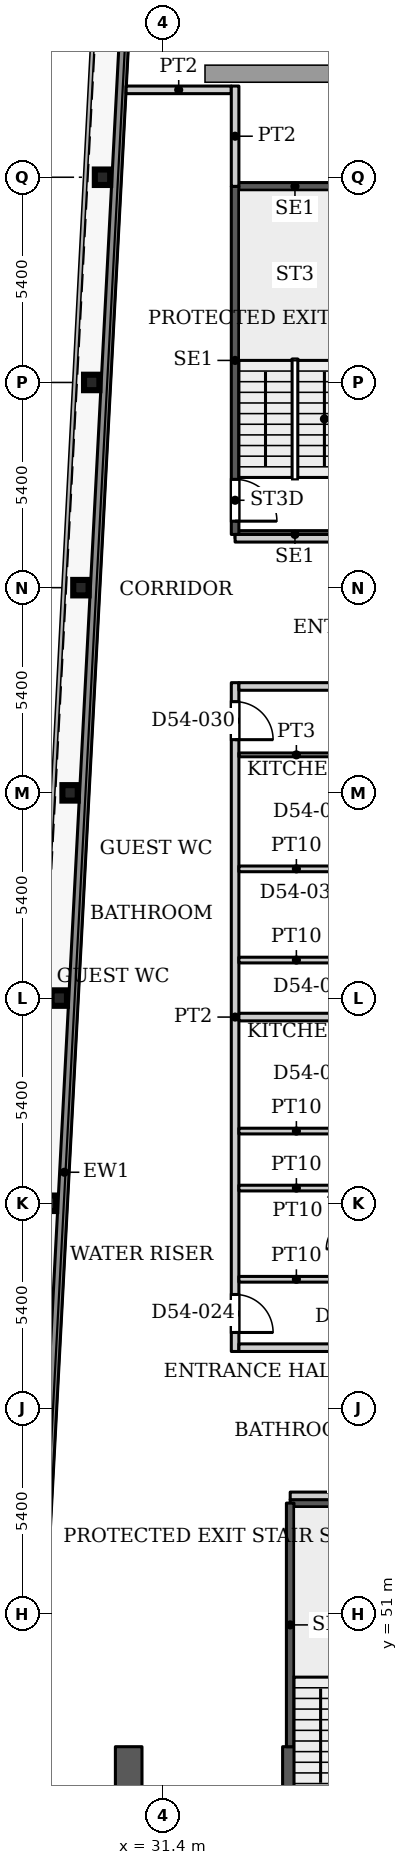
"""IFC4 building model, lengths in metres.
Left out: names, types, materials, properties, quantities, classifications, styles, units other than length and angle.
Written with IfcOpenShell. Run it as: python <this file> out.ifc"""

import sys

from ifc_helpers import new_model, si_unit, direction, frame, frame_2d, origin, origin_2d, place, context, subcontext, project, spatial, rectangle, i_section, extrude, source, transform, mapped, element, fill, save


model = new_model("IFC4")
c1 = context("Model", 3, precision=1e-05, world=origin(), true_north=direction((0.0, 1.0)))
c2 = subcontext(c1, "Body", "Model", "MODEL_VIEW")
j1 = project(units=[si_unit("LENGTHUNIT", "METRE"), si_unit("PLANEANGLEUNIT", "RADIAN")], contexts=[c1])
p1 = place(None, origin())
s1 = spatial("IfcSite", under=j1, at=p1, CompositionType="ELEMENT")
p2 = place(p1, origin())
s2 = spatial("IfcBuilding", under=s1, at=p2, CompositionType="ELEMENT")
p3 = place(p2, frame((0.0, 0.0, 231.8)))
s3 = spatial("IfcBuildingStorey", under=s2, at=p3, CompositionType="ELEMENT", Elevation=231.8)
for number, where, z_axis, x_axis in (
    (1, (28.39, 61.8, 0.0), (0.0, 0.0, 1.0), (1.0, 0.0, 0.0)),
    (2, (28.674, 67.2, 0.0), (0.0, 0.0, 1.0), (1.0, 0.0, 0.0)),
    (3, (28.958, 72.6, 0.0), (0.0, 0.0, 1.0), (1.0, 0.0, 0.0)),
    (4, (29.243, 78.0, 0.0), (0.0, 0.0, 1.0), (1.0, 0.0, 0.0)),
    (5, (29.527, 83.4, 0.0), (0.0, 0.0, 1.0), (1.0, 0.0, 0.0)),
    (6, (29.811, 88.8, 0.0), (0.0, 0.0, 1.0), (1.0, 0.0, 0.0)),
):
    element("IfcColumn", number, at=place(p3, frame(where, z_axis=z_axis, x_axis=x_axis)), inside=s3, PredefinedType="COLUMN", context=c2, shape_type="SweptSolid", body=[
        extrude(i_section(OverallWidth=0.404, OverallDepth=0.407, WebThickness=0.027, FlangeThickness=0.044, FilletRadius=0.012, at=origin_2d()), origin(), (0.0, 0.0, 1.0), 3.9),
    ])
p4 = place(p3, frame((34.75, 29.05, 0.0), z_axis=(0.0, 0.0, 1.0), x_axis=(0.0, 1.0, 0.0)))
e7 = element("IfcWall", 7, at=p4, inside=s3, PredefinedType="SHEAR", context=c2, shape_type="SweptSolid", body=[
    extrude(rectangle(XDim=18.45, YDim=0.4, at=frame_2d((9.225, 0.0))), origin(), (0.0, 0.0, 1.0), 3.9),
])
p5 = place(p4, frame((8.025, 0.0, 0.0)))
e8 = element("IfcOpeningElement", 8, at=p5, cuts=e7, PredefinedType="OPENING", context=c2, shape_type="SweptSolid", body=[
    extrude(rectangle(XDim=1.1, YDim=2.2, at=frame_2d((0.55, 1.1))), frame((0.0, 0.21, 0.0), z_axis=(0.0, -1.0, 0.0), x_axis=(1.0, 0.0, 0.0)), (0.0, 0.0, 1.0), 0.42),
])
p6 = place(p4, frame((10.875, 0.0, 0.0)))
e9 = element("IfcOpeningElement", 9, at=p6, cuts=e7, PredefinedType="OPENING", context=c2, shape_type="SweptSolid", body=[
    extrude(rectangle(XDim=1.1, YDim=2.2, at=frame_2d((0.55, 1.1))), frame((0.0, 0.21, 0.0), z_axis=(0.0, -1.0, 0.0), x_axis=(1.0, 0.0, 0.0)), (0.0, 0.0, 1.0), 0.42),
])
p7 = place(p4, frame((13.725, 0.0, 0.0)))
e10 = element("IfcOpeningElement", 10, at=p7, cuts=e7, PredefinedType="OPENING", context=c2, shape_type="SweptSolid", body=[
    extrude(rectangle(XDim=1.1, YDim=2.2, at=frame_2d((0.55, 1.1))), frame((0.0, 0.21, 0.0), z_axis=(0.0, -1.0, 0.0), x_axis=(1.0, 0.0, 0.0)), (0.0, 0.0, 1.0), 0.42),
])
p8 = place(p4, frame((15.95, 0.0, 0.0)))
e11 = element("IfcOpeningElement", 11, at=p8, cuts=e7, PredefinedType="OPENING", context=c2, shape_type="SweptSolid", body=[
    extrude(rectangle(XDim=1.1, YDim=2.2, at=frame_2d((0.55, 1.1))), frame((0.0, 0.21, 0.0), z_axis=(0.0, -1.0, 0.0), x_axis=(1.0, 0.0, 0.0)), (0.0, 0.0, 1.0), 0.42),
])
p9 = place(p3, frame((30.5, 29.05, 0.0), z_axis=(0.0, 0.0, 1.0), x_axis=(0.0, 1.0, 0.0)))
e12 = element("IfcWall", 12, at=p9, inside=s3, PredefinedType="SHEAR", context=c2, shape_type="SweptSolid", body=[
    extrude(rectangle(XDim=18.45, YDim=0.7, at=frame_2d((9.225, 0.0))), origin(), (0.0, 0.0, 1.0), 3.9),
])
p10 = place(p9, frame((1.5, 0.0, 0.0)))
e13 = element("IfcOpeningElement", 13, at=p10, cuts=e12, PredefinedType="OPENING", context=c2, shape_type="SweptSolid", body=[
    extrude(rectangle(XDim=0.9, YDim=2.2, at=frame_2d((0.45, 1.1))), frame((0.0, 0.36, 0.0), z_axis=(0.0, -1.0, 0.0), x_axis=(1.0, 0.0, 0.0)), (0.0, 0.0, 1.0), 0.72),
])
p11 = place(p9, frame((8.705, 0.0, 0.0)))
e14 = element("IfcOpeningElement", 14, at=p11, cuts=e12, PredefinedType="OPENING", context=c2, shape_type="SweptSolid", body=[
    extrude(rectangle(XDim=0.9, YDim=2.2, at=frame_2d((0.45, 1.1))), frame((0.0, 0.36, 0.0), z_axis=(0.0, -1.0, 0.0), x_axis=(1.0, 0.0, 0.0)), (0.0, 0.0, 1.0), 0.72),
])
p12 = place(p3, frame((27.195, 31.969, 0.0), z_axis=(0.0, 0.0, 1.0), x_axis=(0.052555284099, 0.998618016117, 0.0)))
e15 = element("IfcWall", 15, at=p12, inside=s3, PredefinedType="SOLIDWALL", context=c2, shape_type="SweptSolid", body=[
    extrude(rectangle(XDim=61.38, YDim=0.25, at=frame_2d((30.69, 0.0))), origin(), (0.0, 0.0, 1.0), 3.75),
])
p13 = place(p3, frame((34.75, 53.91, 0.0), z_axis=(0.0, 0.0, 1.0), x_axis=(1.0, 0.0, 0.0)))
e16 = element("IfcWall", 16, at=p13, inside=s3, PredefinedType="SHEAR", context=c2, shape_type="SweptSolid", body=[
    extrude(rectangle(XDim=3.15, YDim=0.2, at=frame_2d((1.575, 0.0))), origin(), (0.0, 0.0, 1.0), 3.9),
])
p14 = place(p3, frame((34.75, 47.5, 0.0), z_axis=(0.0, 0.0, 1.0), x_axis=(0.0, 1.0, 0.0)))
e17 = element("IfcWall", 17, at=p14, inside=s3, PredefinedType="SHEAR", context=c2, shape_type="SweptSolid", body=[
    extrude(rectangle(XDim=6.41, YDim=0.2, at=frame_2d((3.205, 0.0))), origin(), (0.0, 0.0, 1.0), 3.9),
])
for number, where, z_axis, x_axis in (
    (18, (33.3, 79.4, 0.0), (0.0, 0.0, 1.0), (1.0, 0.0, 0.0)),
    (19, (33.3, 88.56, 0.0), (0.0, 0.0, 1.0), (1.0, 0.0, 0.0)),
):
    element("IfcWall", number, at=place(p3, frame(where, z_axis=z_axis, x_axis=x_axis)), inside=s3, PredefinedType="SHEAR", context=c2, shape_type="SweptSolid", body=[
        extrude(rectangle(XDim=3.15, YDim=0.2, at=frame_2d((1.575, 0.0))), origin(), (0.0, 0.0, 1.0), 3.9),
    ])
p15 = place(p3, frame((33.3, 79.4, 0.0), z_axis=(0.0, 0.0, 1.0), x_axis=(0.0, 1.0, 0.0)))
e20 = element("IfcWall", 20, at=p15, inside=s3, PredefinedType="SHEAR", context=c2, shape_type="SweptSolid", body=[
    extrude(rectangle(XDim=9.16, YDim=0.2, at=frame_2d((4.58, 0.0))), origin(), (0.0, 0.0, 1.0), 3.9),
])
p16 = place(p15, frame((0.35, 0.0, 0.0)))
e21 = element("IfcOpeningElement", 21, at=p16, cuts=e20, PredefinedType="OPENING", context=c2, shape_type="SweptSolid", body=[
    extrude(rectangle(XDim=1.1, YDim=2.2, at=frame_2d((0.55, 1.1))), frame((0.0, 0.11, 0.0), z_axis=(0.0, -1.0, 0.0), x_axis=(1.0, 0.0, 0.0)), (0.0, 0.0, 1.0), 0.22),
])
p17 = place(p3, frame((30.432, 91.1, 0.0), z_axis=(0.0, 0.0, 1.0), x_axis=(1.0, 0.0, 0.0)))
e22 = element("IfcWall", 22, at=p17, inside=s3, PredefinedType="PARTITIONING", context=c2, shape_type="SweptSolid", body=[
    extrude(rectangle(XDim=2.768, YDim=0.2, at=frame_2d((1.384, 0.0))), origin(), (0.0, 0.0, 1.0), 3.6),
])
p18 = place(p3, frame((33.3, 57.9, 0.0), z_axis=(0.0, 0.0, 1.0), x_axis=(0.0, 1.0, 0.0)))
e23 = element("IfcWall", 23, at=p18, inside=s3, PredefinedType="PARTITIONING", context=c2, shape_type="SweptSolid", body=[
    extrude(rectangle(XDim=17.6, YDim=0.2, at=frame_2d((8.8, 0.0))), origin(), (0.0, 0.0, 1.0), 3.6),
])
p19 = place(p18, frame((0.5, 0.0, 0.0)))
e24 = element("IfcOpeningElement", 24, at=p19, cuts=e23, PredefinedType="OPENING", context=c2, shape_type="SweptSolid", body=[
    extrude(rectangle(XDim=1.0, YDim=2.1, at=frame_2d((0.5, 1.05))), frame((0.0, 0.11, 0.0), z_axis=(0.0, -1.0, 0.0), x_axis=(1.0, 0.0, 0.0)), (0.0, 0.0, 1.0), 0.22),
])
p20 = place(p18, frame((16.1, 0.0, 0.0)))
e25 = element("IfcOpeningElement", 25, at=p20, cuts=e23, PredefinedType="OPENING", context=c2, shape_type="SweptSolid", body=[
    extrude(rectangle(XDim=1.0, YDim=2.1, at=frame_2d((0.5, 1.05))), frame((0.0, 0.11, 0.0), z_axis=(0.0, -1.0, 0.0), x_axis=(1.0, 0.0, 0.0)), (0.0, 0.0, 1.0), 0.22),
])
p21 = place(p3, frame((33.3, 79.3, 0.0), z_axis=(0.0, 0.0, 1.0), x_axis=(1.0, 0.0, 0.0)))
e26 = element("IfcWall", 26, at=p21, inside=s3, PredefinedType="PARTITIONING", context=c2, shape_type="SweptSolid", body=[
    extrude(rectangle(XDim=12.6, YDim=0.2, at=frame_2d((6.3, 0.0))), origin(), (0.0, 0.0, 1.0), 3.6),
])
p22 = place(p21, frame((5.795, 0.0, 0.0)))
e27 = element("IfcOpeningElement", 27, at=p22, cuts=e26, PredefinedType="OPENING", context=c2, shape_type="SweptSolid", body=[
    extrude(rectangle(XDim=1.0, YDim=2.1, at=frame_2d((0.5, 1.05))), frame((0.0, 0.11, 0.0), z_axis=(0.0, -1.0, 0.0), x_axis=(1.0, 0.0, 0.0)), (0.0, 0.0, 1.0), 0.22),
])
p23 = place(p3, frame((33.3, 88.56, 0.0), z_axis=(0.0, 0.0, 1.0), x_axis=(0.0, 1.0, 0.0)))
e28 = element("IfcWall", 28, at=p23, inside=s3, PredefinedType="PARTITIONING", context=c2, shape_type="SweptSolid", body=[
    extrude(rectangle(XDim=2.64, YDim=0.2, at=frame_2d((1.32, 0.0))), origin(), (0.0, 0.0, 1.0), 3.6),
])
p24 = place(p3, frame((33.4, 58.0, 0.0), z_axis=(0.0, 0.0, 1.0), x_axis=(1.0, 0.0, 0.0)))
e29 = element("IfcWall", 29, at=p24, inside=s3, PredefinedType="PARTITIONING", context=c2, shape_type="SweptSolid", body=[
    extrude(rectangle(XDim=12.5, YDim=0.2, at=frame_2d((6.25, 0.0))), origin(), (0.0, 0.0, 1.0), 3.6),
])
for number, where, z_axis, x_axis in (
    (30, (33.4, 59.8, 0.0), (0.0, 0.0, 1.0), (1.0, 0.0, 0.0)),
    (31, (33.4, 62.2, 0.0), (0.0, 0.0, 1.0), (1.0, 0.0, 0.0)),
    (32, (33.4, 63.7, 0.0), (0.0, 0.0, 1.0), (1.0, 0.0, 0.0)),
):
    element("IfcWall", number, at=place(p3, frame(where, z_axis=z_axis, x_axis=x_axis)), inside=s3, PredefinedType="PARTITIONING", context=c2, shape_type="SweptSolid", body=[
        extrude(rectangle(XDim=3.025, YDim=0.15, at=frame_2d((1.513, 0.0))), origin(), (0.0, 0.0, 1.0), 3.6),
    ])
p25 = place(p3, frame((33.4, 66.7, 0.0), z_axis=(0.0, 0.0, 1.0), x_axis=(1.0, 0.0, 0.0)))
e33 = element("IfcWall", 33, at=p25, inside=s3, PredefinedType="PARTITIONING", context=c2, shape_type="SweptSolid", body=[
    extrude(rectangle(XDim=12.5, YDim=0.2, at=frame_2d((6.25, 0.0))), origin(), (0.0, 0.0, 1.0), 3.6),
])
for number, where, z_axis, x_axis in (
    (34, (33.4, 68.2, 0.0), (0.0, 0.0, 1.0), (1.0, 0.0, 0.0)),
    (35, (33.4, 70.6, 0.0), (0.0, 0.0, 1.0), (1.0, 0.0, 0.0)),
):
    element("IfcWall", number, at=place(p3, frame(where, z_axis=z_axis, x_axis=x_axis)), inside=s3, PredefinedType="PARTITIONING", context=c2, shape_type="SweptSolid", body=[
        extrude(rectangle(XDim=3.025, YDim=0.15, at=frame_2d((1.513, 0.0))), origin(), (0.0, 0.0, 1.0), 3.6),
    ])
p26 = place(p3, frame((33.4, 73.6, 0.0), z_axis=(0.0, 0.0, 1.0), x_axis=(1.0, 0.0, 0.0)))
e36 = element("IfcWall", 36, at=p26, inside=s3, PredefinedType="PARTITIONING", context=c2, shape_type="SweptSolid", body=[
    extrude(rectangle(XDim=3.025, YDim=0.1, at=frame_2d((1.513, 0.0))), origin(), (0.0, 0.0, 1.0), 3.6),
])
p27 = place(p3, frame((33.4, 75.4, 0.0), z_axis=(0.0, 0.0, 1.0), x_axis=(1.0, 0.0, 0.0)))
e37 = element("IfcWall", 37, at=p27, inside=s3, PredefinedType="PARTITIONING", context=c2, shape_type="SweptSolid", body=[
    extrude(rectangle(XDim=12.5, YDim=0.2, at=frame_2d((6.25, 0.0))), origin(), (0.0, 0.0, 1.0), 3.6),
])
p28 = place(p3, frame((34.75, 54.1, 0.0), z_axis=(0.0, 0.0, 1.0), x_axis=(1.0, 0.0, 0.0)))
e38 = element("IfcWall", 38, at=p28, inside=s3, PredefinedType="PARTITIONING", context=c2, shape_type="SweptSolid", body=[
    extrude(rectangle(XDim=11.15, YDim=0.2, at=frame_2d((5.575, 0.0))), origin(), (0.0, 0.0, 1.0), 3.6),
])
p29 = place(p28, frame((5.075, 0.0, 0.0)))
e39 = element("IfcOpeningElement", 39, at=p29, cuts=e38, PredefinedType="OPENING", context=c2, shape_type="SweptSolid", body=[
    extrude(rectangle(XDim=1.0, YDim=2.1, at=frame_2d((0.5, 1.05))), frame((0.0, 0.11, 0.0), z_axis=(0.0, -1.0, 0.0), x_axis=(1.0, 0.0, 0.0)), (0.0, 0.0, 1.0), 0.22),
])
m1 = source(origin(), c2, "Body", "SweptSolid", [
    extrude(rectangle(XDim=1.1, YDim=2.2, at=frame_2d((0.55, 1.1))), frame((0.0, 0.025, 0.0), z_axis=(0.0, -1.0, 0.0), x_axis=(1.0, 0.0, 0.0)), (0.0, 0.0, 1.0), 0.05),
])
p30 = place(p16, origin())
e40 = element("IfcDoor", 40, at=p30, inside=s3, OperationType="SINGLE_SWING_RIGHT", PredefinedType="DOOR", context=c2, shape_type="MappedRepresentation", body=[
    mapped(m1, transform((0.0, 0.0, 0.0), x_axis=(1.0, 0.0, 0.0), y_axis=(0.0, 1.0, 0.0), z_axis=(0.0, 0.0, 1.0), scale=1.0)),
])
fill(e21, e40)
m2 = source(origin(), c2, "Body", "SweptSolid", [
    extrude(rectangle(XDim=1.0, YDim=2.1, at=frame_2d((0.5, 1.05))), frame((0.0, 0.025, 0.0), z_axis=(0.0, -1.0, 0.0), x_axis=(1.0, 0.0, 0.0)), (0.0, 0.0, 1.0), 0.05),
])
p31 = place(p19, origin())
e41 = element("IfcDoor", 41, at=p31, inside=s3, OperationType="SINGLE_SWING_RIGHT", PredefinedType="DOOR", context=c2, shape_type="MappedRepresentation", body=[
    mapped(m2, transform((0.0, 0.0, 0.0), x_axis=(1.0, 0.0, 0.0), y_axis=(0.0, 1.0, 0.0), z_axis=(0.0, 0.0, 1.0), scale=1.0)),
])
fill(e24, e41)
p32 = place(p20, origin())
e42 = element("IfcDoor", 42, at=p32, inside=s3, OperationType="SINGLE_SWING_RIGHT", PredefinedType="DOOR", context=c2, shape_type="MappedRepresentation", body=[
    mapped(m2, transform((0.0, 0.0, 0.0), x_axis=(1.0, 0.0, 0.0), y_axis=(0.0, 1.0, 0.0), z_axis=(0.0, 0.0, 1.0), scale=1.0)),
])
fill(e25, e42)
save(model, sys.argv[1])
